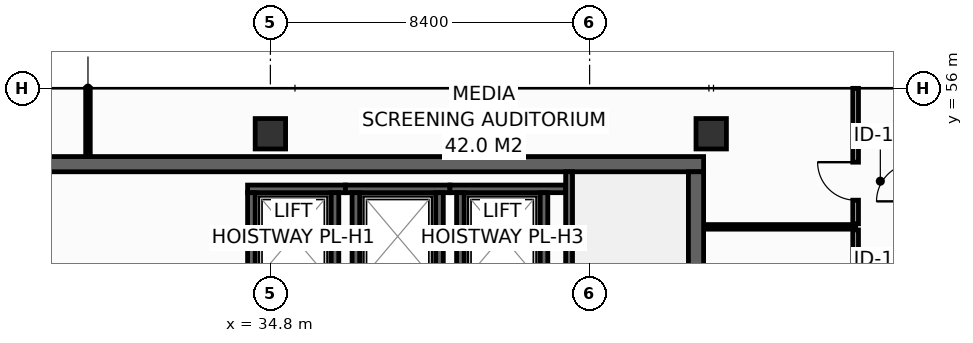
"""IFC4 building model, lengths in metres.
Left out: names, types, materials, properties, quantities, classifications, styles, units other than length and angle.
Written with IfcOpenShell. Run it as: python <this file> out.ifc"""

import sys

from ifc_helpers import new_model, si_unit, direction, frame, frame_2d, origin, origin_2d, place, context, subcontext, project, spatial, rectangle, hollow_rectangle, extrude, element, fill, save


model = new_model("IFC4")
c1 = context("Model", 3, precision=1e-05, world=origin(), true_north=direction((0.0, 1.0)))
c2 = subcontext(c1, "Body", "Model", "MODEL_VIEW")
j1 = project(units=[si_unit("LENGTHUNIT", "METRE"), si_unit("PLANEANGLEUNIT", "RADIAN")], contexts=[c1])
p1 = place(None, origin())
s1 = spatial("IfcSite", under=j1, at=p1, CompositionType="ELEMENT")
p2 = place(p1, origin())
s2 = spatial("IfcBuilding", under=s1, at=p2, CompositionType="ELEMENT")
p3 = place(p2, frame((0.0, 0.0, 234.4)))
s3 = spatial("IfcBuildingStorey", under=s2, at=p3, CompositionType="ELEMENT", Elevation=234.4)
p4 = place(p3, frame((13.7, 54.0, 0.0), z_axis=(0.0, 0.0, 1.0), x_axis=(1.0, 0.0, 0.0)))
e1 = element("IfcWall", 1, at=p4, inside=s3, PredefinedType="SHEAR", context=c2, shape_type="SweptSolid", body=[
    extrude(rectangle(XDim=32.5, YDim=0.4, at=frame_2d((16.25, 0.0))), origin(), (0.0, 0.0, 1.0), 3.55),
])
p5 = place(p3, frame((46.0, 43.4, 0.0), z_axis=(0.0, 0.0, 1.0), x_axis=(0.0, 1.0, 0.0)))
e2 = element("IfcWall", 2, at=p5, inside=s3, PredefinedType="SHEAR", context=c2, shape_type="SweptSolid", body=[
    extrude(rectangle(XDim=10.4, YDim=0.4, at=frame_2d((5.2, 0.0))), origin(), (0.0, 0.0, 1.0), 3.55),
])
for number, where, z_axis, x_axis in (
    (3, (34.8, 54.8, 0.0), (0.0, 0.0, 1.0), (1.0, 0.0, 0.0)),
    (4, (46.4, 54.8, 0.0), (0.0, 0.0, 1.0), (1.0, 0.0, 0.0)),
):
    element("IfcColumn", number, at=place(p3, frame(where, z_axis=z_axis, x_axis=x_axis)), inside=s3, PredefinedType="COLUMN", context=c2, shape_type="SweptSolid", body=[
        extrude(hollow_rectangle(XDim=0.8, YDim=0.8, WallThickness=0.036, at=origin_2d()), origin(), (0.0, 0.0, 1.0), 3.8),
    ])
p6 = place(p3, frame((34.2, 53.35, 0.0), z_axis=(0.0, 0.0, 1.0), x_axis=(1.0, 0.0, 0.0)))
e5 = element("IfcWall", 5, at=p6, inside=s3, PredefinedType="SHEAR", context=c2, shape_type="SweptSolid", body=[
    extrude(rectangle(XDim=2.575, YDim=0.2, at=frame_2d((1.288, 0.0))), origin(), (0.0, 0.0, 1.0), 3.55),
])
for number, where, z_axis, x_axis in (
    (6, (34.3, 50.95, 0.0), (0.0, 0.0, 1.0), (0.0, 1.0, 0.0)),
    (7, (36.5, 50.95, 0.0), (0.0, 0.0, 1.0), (0.0, 1.0, 0.0)),
):
    element("IfcWall", number, at=place(p3, frame(where, z_axis=z_axis, x_axis=x_axis)), inside=s3, PredefinedType="SHEAR", context=c2, shape_type="SweptSolid", body=[
        extrude(rectangle(XDim=2.3, YDim=0.2, at=frame_2d((1.15, 0.0))), origin(), (0.0, 0.0, 1.0), 3.55),
    ])
p7 = place(p3, frame((36.775, 53.35, 0.0), z_axis=(0.0, 0.0, 1.0), x_axis=(1.0, 0.0, 0.0)))
e8 = element("IfcWall", 8, at=p7, inside=s3, PredefinedType="SHEAR", context=c2, shape_type="SweptSolid", body=[
    extrude(rectangle(XDim=2.75, YDim=0.2, at=frame_2d((1.375, 0.0))), origin(), (0.0, 0.0, 1.0), 3.55),
])
for number, where, z_axis, x_axis in (
    (9, (37.05, 50.95, 0.0), (0.0, 0.0, 1.0), (0.0, 1.0, 0.0)),
    (10, (39.25, 50.95, 0.0), (0.0, 0.0, 1.0), (0.0, 1.0, 0.0)),
):
    element("IfcWall", number, at=place(p3, frame(where, z_axis=z_axis, x_axis=x_axis)), inside=s3, PredefinedType="SHEAR", context=c2, shape_type="SweptSolid", body=[
        extrude(rectangle(XDim=2.3, YDim=0.2, at=frame_2d((1.15, 0.0))), origin(), (0.0, 0.0, 1.0), 3.55),
    ])
p8 = place(p3, frame((39.525, 53.35, 0.0), z_axis=(0.0, 0.0, 1.0), x_axis=(1.0, 0.0, 0.0)))
e11 = element("IfcWall", 11, at=p8, inside=s3, PredefinedType="SHEAR", context=c2, shape_type="SweptSolid", body=[
    extrude(rectangle(XDim=3.045, YDim=0.2, at=frame_2d((1.522, 0.0))), origin(), (0.0, 0.0, 1.0), 3.55),
])
for number, where, z_axis, x_axis in (
    (12, (39.8, 50.95, 0.0), (0.0, 0.0, 1.0), (0.0, 1.0, 0.0)),
    (13, (42.0, 50.95, 0.0), (0.0, 0.0, 1.0), (0.0, 1.0, 0.0)),
):
    element("IfcWall", number, at=place(p3, frame(where, z_axis=z_axis, x_axis=x_axis)), inside=s3, PredefinedType="SHEAR", context=c2, shape_type="SweptSolid", body=[
        extrude(rectangle(XDim=2.3, YDim=0.2, at=frame_2d((1.15, 0.0))), origin(), (0.0, 0.0, 1.0), 3.55),
    ])
p9 = place(p3, frame((42.66, 53.8, 0.0), z_axis=(0.0, 0.0, 1.0), x_axis=(0.0, -1.0, 0.0)))
e14 = element("IfcWall", 14, at=p9, inside=s3, PredefinedType="SHEAR", context=c2, shape_type="SweptSolid", body=[
    extrude(rectangle(XDim=10.4, YDim=0.18, at=frame_2d((5.2, 0.0))), origin(), (0.0, 0.0, 1.0), 3.55),
])
p10 = place(p9, frame((8.99, 0.0, 0.0)))
e15 = element("IfcOpeningElement", 15, at=p10, cuts=e14, PredefinedType="OPENING", context=c2, shape_type="SweptSolid", body=[
    extrude(rectangle(XDim=1.1, YDim=2.15, at=frame_2d((0.55, 1.075))), frame((0.0, 0.1, 0.0), z_axis=(0.0, -1.0, 0.0), x_axis=(1.0, 0.0, 0.0)), (0.0, 0.0, 1.0), 0.2),
])
p11 = place(p3, frame((46.22, 52.35, 0.0), z_axis=(0.0, 0.0, 1.0), x_axis=(1.0, 0.0, 0.0)))
e16 = element("IfcWall", 16, at=p11, inside=s3, PredefinedType="PARTITIONING", context=c2, shape_type="SweptSolid", body=[
    extrude(rectangle(XDim=3.98, YDim=0.12, at=frame_2d((1.99, 0.0))), origin(), (0.0, 0.0, 1.0), 3.55),
])
p12 = place(p3, frame((30.0, 54.22, 0.0), z_axis=(0.0, 0.0, 1.0), x_axis=(0.0, 1.0, 0.0)))
e17 = element("IfcWall", 17, at=p12, inside=s3, PredefinedType="PARTITIONING", context=c2, shape_type="SweptSolid", body=[
    extrude(rectangle(XDim=1.775, YDim=0.12, at=frame_2d((0.888, 0.0))), origin(), (0.0, 0.0, 1.0), 2.935),
])
p13 = place(p3, frame((50.2, 48.29, 0.0), z_axis=(0.0, 0.0, 1.0), x_axis=(0.0, 1.0, 0.0)))
e18 = element("IfcWall", 18, at=p13, inside=s3, PredefinedType="PARTITIONING", context=c2, shape_type="SweptSolid", body=[
    extrude(rectangle(XDim=3.98, YDim=0.15, at=frame_2d((1.99, 0.0))), origin(), (0.0, 0.0, 1.0), 3.55),
])
p14 = place(p13, frame((1.49, 0.0, 0.0)))
e19 = element("IfcOpeningElement", 19, at=p14, cuts=e18, PredefinedType="OPENING", context=c2, shape_type="SweptSolid", body=[
    extrude(rectangle(XDim=1.0, YDim=2.15, at=frame_2d((0.5, 1.075))), frame((0.0, 0.085, 0.0), z_axis=(0.0, -1.0, 0.0), x_axis=(1.0, 0.0, 0.0)), (0.0, 0.0, 1.0), 0.17),
])
p15 = place(p3, frame((50.2, 52.43, 0.0), z_axis=(0.0, 0.0, 1.0), x_axis=(0.0, 1.0, 0.0)))
e20 = element("IfcWall", 20, at=p15, inside=s3, PredefinedType="PARTITIONING", context=c2, shape_type="SweptSolid", body=[
    extrude(rectangle(XDim=3.565, YDim=0.15, at=frame_2d((1.783, 0.0))), origin(), (0.0, 0.0, 1.0), 2.935),
])
p16 = place(p15, frame((0.622, 0.0, 0.0)))
e21 = element("IfcOpeningElement", 21, at=p16, cuts=e20, PredefinedType="OPENING", context=c2, shape_type="SweptSolid", body=[
    extrude(rectangle(XDim=1.0, YDim=2.15, at=frame_2d((0.5, 1.075))), frame((0.0, 0.085, 0.0), z_axis=(0.0, -1.0, 0.0), x_axis=(1.0, 0.0, 0.0)), (0.0, 0.0, 1.0), 0.17),
])
p17 = place(p16, origin())
e22 = element("IfcDoor", 22, at=p17, inside=s3, OperationType="SINGLE_SWING_RIGHT", PredefinedType="DOOR", context=c2, shape_type="SweptSolid", body=[
    extrude(rectangle(XDim=1.0, YDim=2.15, at=frame_2d((0.5, 1.075))), frame((0.0, 0.025, 0.0), z_axis=(0.0, -1.0, 0.0), x_axis=(1.0, 0.0, 0.0)), (0.0, 0.0, 1.0), 0.05),
])
fill(e21, e22)
save(model, sys.argv[1])
